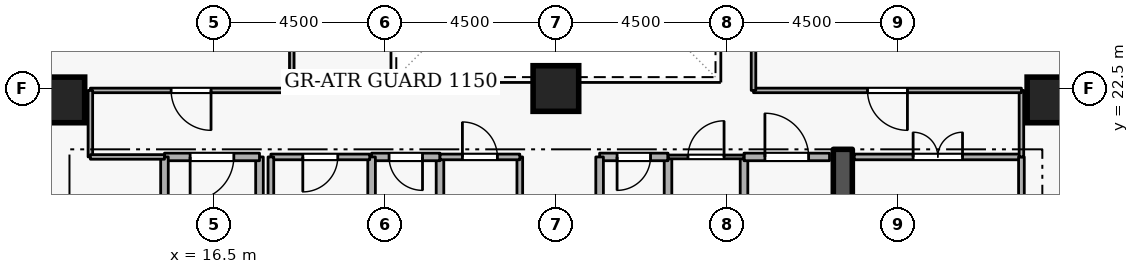
"""IFC4 building model, lengths in metres.
Left out: names, types, materials, properties, quantities, classifications, styles, units other than length and angle.
Written with IfcOpenShell. Run it as: python <this file> out.ifc"""

import sys

from ifc_helpers import new_model, si_unit, direction, frame, frame_2d, origin, origin_2d, place, context, subcontext, project, spatial, rectangle, extrude, element, fill, save


model = new_model("IFC4")
c1 = context("Model", 3, precision=1e-05, world=origin(), true_north=direction((0.0, 1.0)))
c2 = subcontext(c1, "Body", "Model", "MODEL_VIEW")
j1 = project(units=[si_unit("LENGTHUNIT", "METRE"), si_unit("PLANEANGLEUNIT", "RADIAN")], contexts=[c1])
p1 = place(None, origin())
s1 = spatial("IfcSite", under=j1, at=p1, CompositionType="ELEMENT")
p2 = place(p1, origin())
s2 = spatial("IfcBuilding", under=s1, at=p2, CompositionType="ELEMENT")
p3 = place(p2, frame((0.0, 0.0, 119.7)))
s3 = spatial("IfcBuildingStorey", under=s2, at=p3, CompositionType="ELEMENT", Elevation=119.7)
p4 = place(p3, frame((33.05, 15.1, 0.0), z_axis=(0.0, 0.0, 1.0), x_axis=(0.0, 1.0, 0.0)))
e1 = element("IfcWall", 1, at=p4, inside=s3, PredefinedType="SHEAR", context=c2, shape_type="SweptSolid", body=[
    extrude(rectangle(XDim=5.8, YDim=0.5, at=frame_2d((2.9, 0.0))), origin(), (0.0, 0.0, 1.0), 3.6),
])
for number, where, z_axis, x_axis in (
    (2, (12.5, 22.2, 0.0), (0.0, 0.0, 1.0), (1.0, 0.0, 0.0)),
    (3, (38.5, 22.2, 0.0), (0.0, 0.0, 1.0), (1.0, 0.0, 0.0)),
    (4, (25.5, 22.5, 0.0), (0.0, 0.0, 1.0), (1.0, 0.0, 0.0)),
):
    element("IfcColumn", number, at=place(p3, frame(where, z_axis=z_axis, x_axis=x_axis)), inside=s3, PredefinedType="COLUMN", context=c2, shape_type="SweptSolid", body=[
        extrude(rectangle(XDim=1.2, YDim=1.2, at=origin_2d()), origin(), (0.0, 0.0, 1.0), 3.6),
    ])
p5 = place(p3, frame((17.7, 18.4, 0.0), z_axis=(0.0, 0.0, 1.0), x_axis=(0.0, 1.0, 0.0)))
e5 = element("IfcWall", 5, at=p5, inside=s3, PredefinedType="STANDARD", context=c2, shape_type="SweptSolid", body=[
    extrude(rectangle(XDim=2.3, YDim=0.2, at=frame_2d((1.15, 0.0))), origin(), (0.0, 0.0, 1.0), 2.525),
])
p6 = place(p3, frame((17.7, 20.7, 0.0), z_axis=(0.0, 0.0, 1.0), x_axis=(-1.0, 0.0, 0.0)))
e6 = element("IfcWall", 6, at=p6, inside=s3, PredefinedType="STANDARD", context=c2, shape_type="SweptSolid", body=[
    extrude(rectangle(XDim=2.5, YDim=0.2, at=frame_2d((1.25, 0.0))), origin(), (0.0, 0.0, 1.0), 3.32),
])
p7 = place(p6, frame((0.675, 0.0, 0.0)))
e7 = element("IfcOpeningElement", 7, at=p7, cuts=e6, PredefinedType="OPENING", context=c2, shape_type="SweptSolid", body=[
    extrude(rectangle(XDim=1.15, YDim=2.1, at=frame_2d((0.575, 1.05))), frame((0.0, 0.11, 0.0), z_axis=(0.0, -1.0, 0.0), x_axis=(1.0, 0.0, 0.0)), (0.0, 0.0, 1.0), 0.22),
])
p8 = place(p3, frame((15.2, 20.7, 0.0), z_axis=(0.0, 0.0, 1.0), x_axis=(0.0, -1.0, 0.0)))
e8 = element("IfcWall", 8, at=p8, inside=s3, PredefinedType="STANDARD", context=c2, shape_type="SweptSolid", body=[
    extrude(rectangle(XDim=5.7, YDim=0.2, at=frame_2d((2.85, 0.0))), origin(), (0.0, 0.0, 1.0), 3.32),
])
p9 = place(p3, frame((28.45, 18.65, 0.0), z_axis=(0.0, 0.0, 1.0), x_axis=(0.0, 1.0, 0.0)))
e9 = element("IfcWall", 9, at=p9, inside=s3, PredefinedType="STANDARD", context=c2, shape_type="SweptSolid", body=[
    extrude(rectangle(XDim=2.05, YDim=0.2, at=frame_2d((1.025, 0.0))), origin(), (0.0, 0.0, 1.0), 3.32),
])
p10 = place(p3, frame((28.45, 20.7, 0.0), z_axis=(0.0, 0.0, 1.0), x_axis=(-1.0, 0.0, 0.0)))
e10 = element("IfcWall", 10, at=p10, inside=s3, PredefinedType="STANDARD", context=c2, shape_type="SweptSolid", body=[
    extrude(rectangle(XDim=1.8, YDim=0.2, at=frame_2d((0.9, 0.0))), origin(), (0.0, 0.0, 1.0), 3.32),
])
p11 = place(p10, frame((0.46, 0.0, 0.0)))
e11 = element("IfcOpeningElement", 11, at=p11, cuts=e10, PredefinedType="OPENING", context=c2, shape_type="SweptSolid", body=[
    extrude(rectangle(XDim=0.88, YDim=2.04, at=frame_2d((0.44, 1.02))), frame((0.0, 0.11, 0.0), z_axis=(0.0, -1.0, 0.0), x_axis=(1.0, 0.0, 0.0)), (0.0, 0.0, 1.0), 0.22),
])
for number, where, z_axis, x_axis in (
    (12, (26.65, 20.7, 0.0), (0.0, 0.0, 1.0), (0.0, -1.0, 0.0)),
    (13, (22.45, 18.65, 0.0), (0.0, 0.0, 1.0), (0.0, 1.0, 0.0)),
):
    element("IfcWall", number, at=place(p3, frame(where, z_axis=z_axis, x_axis=x_axis)), inside=s3, PredefinedType="STANDARD", context=c2, shape_type="SweptSolid", body=[
        extrude(rectangle(XDim=2.05, YDim=0.2, at=frame_2d((1.025, 0.0))), origin(), (0.0, 0.0, 1.0), 3.32),
    ])
p12 = place(p3, frame((22.45, 20.7, 0.0), z_axis=(0.0, 0.0, 1.0), x_axis=(-1.0, 0.0, 0.0)))
e14 = element("IfcWall", 14, at=p12, inside=s3, PredefinedType="STANDARD", context=c2, shape_type="SweptSolid", body=[
    extrude(rectangle(XDim=1.8, YDim=0.2, at=frame_2d((0.9, 0.0))), origin(), (0.0, 0.0, 1.0), 3.32),
])
p13 = place(p12, frame((0.46, 0.0, 0.0)))
e15 = element("IfcOpeningElement", 15, at=p13, cuts=e14, PredefinedType="OPENING", context=c2, shape_type="SweptSolid", body=[
    extrude(rectangle(XDim=0.88, YDim=2.04, at=frame_2d((0.44, 1.02))), frame((0.0, 0.11, 0.0), z_axis=(0.0, -1.0, 0.0), x_axis=(1.0, 0.0, 0.0)), (0.0, 0.0, 1.0), 0.22),
])
for number, where, z_axis, x_axis in (
    (16, (20.65, 20.7, 0.0), (0.0, 0.0, 1.0), (0.0, -1.0, 0.0)),
    (17, (30.45, 18.65, 0.0), (0.0, 0.0, 1.0), (0.0, 1.0, 0.0)),
):
    element("IfcWall", number, at=place(p3, frame(where, z_axis=z_axis, x_axis=x_axis)), inside=s3, PredefinedType="STANDARD", context=c2, shape_type="SweptSolid", body=[
        extrude(rectangle(XDim=2.05, YDim=0.2, at=frame_2d((1.025, 0.0))), origin(), (0.0, 0.0, 1.0), 3.32),
    ])
p14 = place(p3, frame((30.45, 20.7, 0.0), z_axis=(0.0, 0.0, 1.0), x_axis=(1.0, 0.0, 0.0)))
e18 = element("IfcWall", 18, at=p14, inside=s3, PredefinedType="STANDARD", context=c2, shape_type="SweptSolid", body=[
    extrude(rectangle(XDim=2.25, YDim=0.2, at=frame_2d((1.125, 0.0))), origin(), (0.0, 0.0, 1.0), 3.32),
])
p15 = place(p14, frame((0.55, 0.0, 0.0)))
e19 = element("IfcOpeningElement", 19, at=p15, cuts=e18, PredefinedType="OPENING", context=c2, shape_type="SweptSolid", body=[
    extrude(rectangle(XDim=1.15, YDim=2.1, at=frame_2d((0.575, 1.05))), frame((0.0, 0.11, 0.0), z_axis=(0.0, -1.0, 0.0), x_axis=(1.0, 0.0, 0.0)), (0.0, 0.0, 1.0), 0.22),
])
p16 = place(p3, frame((20.6, 20.7, 0.0), z_axis=(0.0, 0.0, 1.0), x_axis=(-1.0, 0.0, 0.0)))
e20 = element("IfcWall", 20, at=p16, inside=s3, PredefinedType="PARTITIONING", context=c2, shape_type="SweptSolid", body=[
    extrude(rectangle(XDim=2.6, YDim=0.15, at=frame_2d((1.3, 0.0))), origin(), (0.0, 0.0, 1.0), 3.32),
])
p17 = place(p16, frame((0.84, 0.0, 0.0)))
e21 = element("IfcOpeningElement", 21, at=p17, cuts=e20, PredefinedType="OPENING", context=c2, shape_type="SweptSolid", body=[
    extrude(rectangle(XDim=0.92, YDim=2.08, at=frame_2d((0.46, 1.04))), frame((0.0, 0.085, 0.0), z_axis=(0.0, -1.0, 0.0), x_axis=(1.0, 0.0, 0.0)), (0.0, 0.0, 1.0), 0.17),
])
p18 = place(p3, frame((18.0, 20.7, 0.0), z_axis=(0.0, 0.0, 1.0), x_axis=(0.0, -1.0, 0.0)))
e22 = element("IfcWall", 22, at=p18, inside=s3, PredefinedType="PARTITIONING", context=c2, shape_type="SweptSolid", body=[
    extrude(rectangle(XDim=2.05, YDim=0.15, at=frame_2d((1.025, 0.0))), origin(), (0.0, 0.0, 1.0), 2.525),
])
p19 = place(p3, frame((24.55, 20.7, 0.0), z_axis=(0.0, 0.0, 1.0), x_axis=(0.0, -1.0, 0.0)))
e23 = element("IfcWall", 23, at=p19, inside=s3, PredefinedType="PARTITIONING", context=c2, shape_type="SweptSolid", body=[
    extrude(rectangle(XDim=2.05, YDim=0.15, at=frame_2d((1.025, 0.0))), origin(), (0.0, 0.0, 1.0), 3.32),
])
p20 = place(p3, frame((22.45, 20.7, 0.0), z_axis=(0.0, 0.0, 1.0), x_axis=(1.0, 0.0, 0.0)))
e24 = element("IfcWall", 24, at=p20, inside=s3, PredefinedType="PARTITIONING", context=c2, shape_type="SweptSolid", body=[
    extrude(rectangle(XDim=2.1, YDim=0.15, at=frame_2d((1.05, 0.0))), origin(), (0.0, 0.0, 1.0), 3.32),
])
p21 = place(p20, frame((0.59, 0.0, 0.0)))
e25 = element("IfcOpeningElement", 25, at=p21, cuts=e24, PredefinedType="OPENING", context=c2, shape_type="SweptSolid", body=[
    extrude(rectangle(XDim=0.92, YDim=2.08, at=frame_2d((0.46, 1.04))), frame((0.0, 0.085, 0.0), z_axis=(0.0, -1.0, 0.0), x_axis=(1.0, 0.0, 0.0)), (0.0, 0.0, 1.0), 0.17),
])
p22 = place(p3, frame((28.45, 20.7, 0.0), z_axis=(0.0, 0.0, 1.0), x_axis=(1.0, 0.0, 0.0)))
e26 = element("IfcWall", 26, at=p22, inside=s3, PredefinedType="PARTITIONING", context=c2, shape_type="SweptSolid", body=[
    extrude(rectangle(XDim=2.0, YDim=0.1, at=frame_2d((1.0, 0.0))), origin(), (0.0, 0.0, 1.0), 3.32),
])
p23 = place(p22, frame((0.525, 0.0, 0.0)))
e27 = element("IfcOpeningElement", 27, at=p23, cuts=e26, PredefinedType="OPENING", context=c2, shape_type="SweptSolid", body=[
    extrude(rectangle(XDim=0.95, YDim=2.1, at=frame_2d((0.475, 1.05))), frame((0.0, 0.06, 0.0), z_axis=(0.0, -1.0, 0.0), x_axis=(1.0, 0.0, 0.0)), (0.0, 0.0, 1.0), 0.12),
])
p24 = place(p3, frame((33.35, 20.7, 0.0), z_axis=(0.0, 0.0, 1.0), x_axis=(1.0, 0.0, 0.0)))
e28 = element("IfcWall", 28, at=p24, inside=s3, PredefinedType="PARTITIONING", context=c2, shape_type="SweptSolid", body=[
    extrude(rectangle(XDim=4.4, YDim=0.15, at=frame_2d((2.2, 0.0))), origin(), (0.0, 0.0, 1.0), 3.32),
])
p25 = place(p24, frame((1.55, 0.0, 0.0)))
e29 = element("IfcOpeningElement", 29, at=p25, cuts=e28, PredefinedType="OPENING", context=c2, shape_type="SweptSolid", body=[
    extrude(rectangle(XDim=1.3, YDim=2.12, at=frame_2d((0.65, 1.06))), frame((0.0, 0.085, 0.0), z_axis=(0.0, -1.0, 0.0), x_axis=(1.0, 0.0, 0.0)), (0.0, 0.0, 1.0), 0.17),
])
p26 = place(p3, frame((37.75, 20.7, 0.0), z_axis=(0.0, 0.0, 1.0), x_axis=(0.0, -1.0, 0.0)))
e30 = element("IfcWall", 30, at=p26, inside=s3, PredefinedType="PARTITIONING", context=c2, shape_type="SweptSolid", body=[
    extrude(rectangle(XDim=2.9, YDim=0.15, at=frame_2d((1.45, 0.0))), origin(), (0.0, 0.0, 1.0), 3.32),
])
p27 = place(p3, frame((18.55, 22.45, 0.0), z_axis=(0.0, 0.0, 1.0), x_axis=(-1.0, 0.0, 0.0)))
e31 = element("IfcWall", 31, at=p27, inside=s3, PredefinedType="PARTITIONING", context=c2, shape_type="SweptSolid", body=[
    extrude(rectangle(XDim=5.3, YDim=0.12, at=frame_2d((2.65, 0.0))), origin(), (0.0, 0.0, 1.0), 3.32),
])
p28 = place(p27, frame((2.125, 0.0, 0.0)))
e32 = element("IfcOpeningElement", 32, at=p28, cuts=e31, PredefinedType="OPENING", context=c2, shape_type="SweptSolid", body=[
    extrude(rectangle(XDim=1.05, YDim=2.1, at=frame_2d((0.525, 1.05))), frame((0.0, 0.07, 0.0), z_axis=(0.0, -1.0, 0.0), x_axis=(1.0, 0.0, 0.0)), (0.0, 0.0, 1.0), 0.14),
])
p29 = place(p3, frame((13.25, 22.45, 0.0), z_axis=(0.0, 0.0, 1.0), x_axis=(0.0, -1.0, 0.0)))
e33 = element("IfcWall", 33, at=p29, inside=s3, PredefinedType="PARTITIONING", context=c2, shape_type="SweptSolid", body=[
    extrude(rectangle(XDim=1.75, YDim=0.12, at=frame_2d((0.875, 0.0))), origin(), (0.0, 0.0, 1.0), 3.32),
])
p30 = place(p3, frame((13.25, 20.7, 0.0), z_axis=(0.0, 0.0, 1.0), x_axis=(1.0, 0.0, 0.0)))
e34 = element("IfcWall", 34, at=p30, inside=s3, PredefinedType="PARTITIONING", context=c2, shape_type="SweptSolid", body=[
    extrude(rectangle(XDim=1.95, YDim=0.12, at=frame_2d((0.975, 0.0))), origin(), (0.0, 0.0, 1.0), 3.32),
])
p31 = place(p3, frame((18.55, 27.0, 0.0), z_axis=(0.0, 0.0, 1.0), x_axis=(0.0, -1.0, 0.0)))
e35 = element("IfcWall", 35, at=p31, inside=s3, PredefinedType="PARTITIONING", context=c2, shape_type="SweptSolid", body=[
    extrude(rectangle(XDim=4.55, YDim=0.12, at=frame_2d((2.275, 0.0))), origin(), (0.0, 0.0, 1.0), 3.32),
])
p32 = place(p3, frame((37.75, 20.7, 0.0), z_axis=(0.0, 0.0, 1.0), x_axis=(0.0, 1.0, 0.0)))
e36 = element("IfcWall", 36, at=p32, inside=s3, PredefinedType="PARTITIONING", context=c2, shape_type="SweptSolid", body=[
    extrude(rectangle(XDim=1.75, YDim=0.12, at=frame_2d((0.875, 0.0))), origin(), (0.0, 0.0, 1.0), 3.32),
])
p33 = place(p3, frame((37.75, 22.45, 0.0), z_axis=(0.0, 0.0, 1.0), x_axis=(-1.0, 0.0, 0.0)))
e37 = element("IfcWall", 37, at=p33, inside=s3, PredefinedType="PARTITIONING", context=c2, shape_type="SweptSolid", body=[
    extrude(rectangle(XDim=7.05, YDim=0.12, at=frame_2d((3.525, 0.0))), origin(), (0.0, 0.0, 1.0), 3.32),
])
p34 = place(p33, frame((3.0, 0.0, 0.0)))
e38 = element("IfcOpeningElement", 38, at=p34, cuts=e37, PredefinedType="OPENING", context=c2, shape_type="SweptSolid", body=[
    extrude(rectangle(XDim=1.05, YDim=2.1, at=frame_2d((0.525, 1.05))), frame((0.0, 0.07, 0.0), z_axis=(0.0, -1.0, 0.0), x_axis=(1.0, 0.0, 0.0)), (0.0, 0.0, 1.0), 0.14),
])
p35 = place(p3, frame((30.7, 22.45, 0.0), z_axis=(0.0, 0.0, 1.0), x_axis=(0.0, 1.0, 0.0)))
e39 = element("IfcWall", 39, at=p35, inside=s3, PredefinedType="PARTITIONING", context=c2, shape_type="SweptSolid", body=[
    extrude(rectangle(XDim=4.55, YDim=0.12, at=frame_2d((2.275, 0.0))), origin(), (0.0, 0.0, 1.0), 3.32),
])
p36 = place(p7, origin())
e40 = element("IfcDoor", 40, at=p36, inside=s3, OperationType="SINGLE_SWING_RIGHT", PredefinedType="DOOR", context=c2, shape_type="SweptSolid", body=[
    extrude(rectangle(XDim=1.15, YDim=2.1, at=frame_2d((0.575, 1.05))), frame((0.0, 0.025, 0.0), z_axis=(0.0, -1.0, 0.0), x_axis=(1.0, 0.0, 0.0)), (0.0, 0.0, 1.0), 0.05),
])
fill(e7, e40)
p37 = place(p11, origin())
e41 = element("IfcDoor", 41, at=p37, inside=s3, OperationType="SINGLE_SWING_RIGHT", PredefinedType="DOOR", context=c2, shape_type="SweptSolid", body=[
    extrude(rectangle(XDim=0.88, YDim=2.04, at=frame_2d((0.44, 1.02))), frame((0.0, 0.025, 0.0), z_axis=(0.0, -1.0, 0.0), x_axis=(1.0, 0.0, 0.0)), (0.0, 0.0, 1.0), 0.05),
])
fill(e11, e41)
p38 = place(p13, origin())
e42 = element("IfcDoor", 42, at=p38, inside=s3, OperationType="SINGLE_SWING_LEFT", PredefinedType="DOOR", context=c2, shape_type="SweptSolid", body=[
    extrude(rectangle(XDim=0.88, YDim=2.04, at=frame_2d((0.44, 1.02))), frame((0.0, 0.025, 0.0), z_axis=(0.0, -1.0, 0.0), x_axis=(1.0, 0.0, 0.0)), (0.0, 0.0, 1.0), 0.05),
])
fill(e15, e42)
p39 = place(p17, origin())
e43 = element("IfcDoor", 43, at=p39, inside=s3, OperationType="SINGLE_SWING_RIGHT", PredefinedType="DOOR", context=c2, shape_type="SweptSolid", body=[
    extrude(rectangle(XDim=0.92, YDim=2.08, at=frame_2d((0.46, 1.04))), frame((0.0, 0.025, 0.0), z_axis=(0.0, -1.0, 0.0), x_axis=(1.0, 0.0, 0.0)), (0.0, 0.0, 1.0), 0.05),
])
fill(e21, e43)
p40 = place(p21, origin())
e44 = element("IfcDoor", 44, at=p40, inside=s3, OperationType="SINGLE_SWING_LEFT", PredefinedType="DOOR", context=c2, shape_type="SweptSolid", body=[
    extrude(rectangle(XDim=0.92, YDim=2.08, at=frame_2d((0.46, 1.04))), frame((0.0, 0.025, 0.0), z_axis=(0.0, -1.0, 0.0), x_axis=(1.0, 0.0, 0.0)), (0.0, 0.0, 1.0), 0.05),
])
fill(e25, e44)
p41 = place(p23, origin())
e45 = element("IfcDoor", 45, at=p41, inside=s3, OperationType="SINGLE_SWING_RIGHT", PredefinedType="DOOR", context=c2, shape_type="SweptSolid", body=[
    extrude(rectangle(XDim=0.95, YDim=2.1, at=frame_2d((0.475, 1.05))), frame((0.0, 0.025, 0.0), z_axis=(0.0, -1.0, 0.0), x_axis=(1.0, 0.0, 0.0)), (0.0, 0.0, 1.0), 0.05),
])
fill(e27, e45)
p42 = place(p15, origin())
e46 = element("IfcDoor", 46, at=p42, inside=s3, OperationType="SINGLE_SWING_LEFT", PredefinedType="DOOR", context=c2, shape_type="SweptSolid", body=[
    extrude(rectangle(XDim=1.15, YDim=2.1, at=frame_2d((0.575, 1.05))), frame((0.0, 0.025, 0.0), z_axis=(0.0, -1.0, 0.0), x_axis=(1.0, 0.0, 0.0)), (0.0, 0.0, 1.0), 0.05),
])
fill(e19, e46)
p43 = place(p25, origin())
e47 = element("IfcDoor", 47, at=p43, inside=s3, OperationType="DOUBLE_DOOR_SINGLE_SWING", PredefinedType="DOOR", context=c2, shape_type="SweptSolid", body=[
    extrude(rectangle(XDim=1.3, YDim=2.12, at=frame_2d((0.65, 1.06))), frame((0.0, 0.025, 0.0), z_axis=(0.0, -1.0, 0.0), x_axis=(1.0, 0.0, 0.0)), (0.0, 0.0, 1.0), 0.05),
])
fill(e29, e47)
p44 = place(p28, origin())
e48 = element("IfcDoor", 48, at=p44, inside=s3, OperationType="SINGLE_SWING_LEFT", PredefinedType="DOOR", context=c2, shape_type="SweptSolid", body=[
    extrude(rectangle(XDim=1.05, YDim=2.1, at=frame_2d((0.525, 1.05))), frame((0.0, 0.025, 0.0), z_axis=(0.0, -1.0, 0.0), x_axis=(1.0, 0.0, 0.0)), (0.0, 0.0, 1.0), 0.05),
])
fill(e32, e48)
p45 = place(p34, origin())
e49 = element("IfcDoor", 49, at=p45, inside=s3, OperationType="SINGLE_SWING_LEFT", PredefinedType="DOOR", context=c2, shape_type="SweptSolid", body=[
    extrude(rectangle(XDim=1.05, YDim=2.1, at=frame_2d((0.525, 1.05))), frame((0.0, 0.025, 0.0), z_axis=(0.0, -1.0, 0.0), x_axis=(1.0, 0.0, 0.0)), (0.0, 0.0, 1.0), 0.05),
])
fill(e38, e49)
save(model, sys.argv[1])
